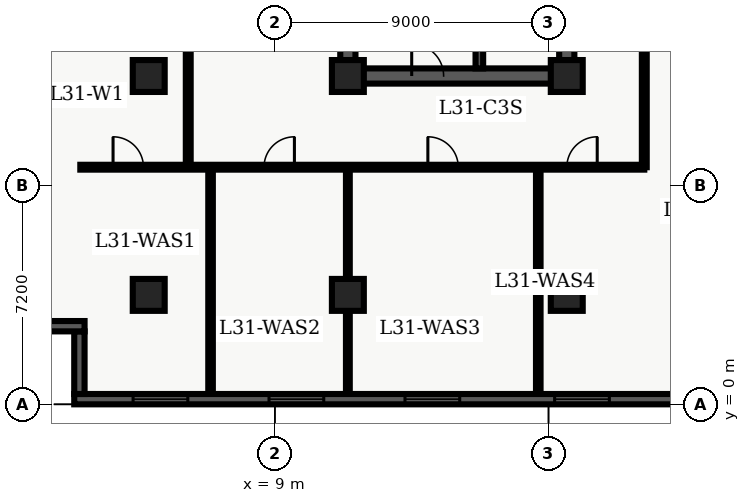
"""IFC4 building model, lengths in metres.
Left out: names, types, materials, properties, quantities, classifications, styles, units other than length and angle.
Written with IfcOpenShell. Run it as: python <this file> out.ifc"""

import sys

from ifc_helpers import new_model, entity, si_unit, converted_unit, direction, frame, origin_with_axes, origin_2d_with_axis, place, context, subcontext, project, spatial, polyline, rectangle, outline, extrude, element, fill, save


model = new_model("IFC4")
c1 = context("Model", 3, precision=1e-05, world=origin_with_axes(), true_north=direction((0.0, 1.0)))
c2 = subcontext(c1, "Body", "Model", "MODEL_VIEW")
j1 = project(units=[si_unit("LENGTHUNIT", "METRE"), converted_unit("PLANEANGLEUNIT", "DEGREE", entity("IfcPlaneAngleMeasure", 0.017), si_unit("PLANEANGLEUNIT", "RADIAN"), dimensions=[0, 0, 0, 0, 0, 0, 0])], contexts=[c1])
p1 = place(None, origin_with_axes())
s1 = spatial("IfcSite", under=j1, at=p1, CompositionType="ELEMENT")
p2 = place(p1, origin_with_axes())
s2 = spatial("IfcBuilding", under=s1, at=p2, CompositionType="ELEMENT")
p3 = place(p2, frame((0.0, 0.0, 129.0), z_axis=(0.0, 0.0, 1.0), x_axis=(1.0, 0.0, 0.0)))
s3 = spatial("IfcBuildingStorey", under=s2, at=p3, CompositionType="ELEMENT", Elevation=129.0)
p4 = place(p3, frame((11.4, 10.8, 0.0), z_axis=(0.0, 0.0, 1.0), x_axis=(0.0, 1.0, 0.0)))
e1 = element("IfcWall", 1, at=p4, inside=s3, PredefinedType="SHEAR", context=c2, shape_type="SweptSolid", body=[
    extrude(outline(polyline([(0.0, -0.25), (27.0, -0.25), (27.0, 0.25), (0.0, 0.25), (0.0, -0.25)])), origin_with_axes(), (0.0, 0.0, 1.0), 3.66),
])
p5 = place(p3, frame((11.4, 10.8, 0.0), z_axis=(0.0, 0.0, 1.0), x_axis=(1.0, 0.0, 0.0)))
e2 = element("IfcWall", 2, at=p5, inside=s3, PredefinedType="SHEAR", context=c2, shape_type="SweptSolid", body=[
    extrude(outline(polyline([(0.0, -0.25), (7.2, -0.25), (7.2, 0.25), (0.0, 0.25), (0.0, -0.25)])), origin_with_axes(), (0.0, 0.0, 1.0), 3.66),
])
p6 = place(p5, frame((2.625, 0.0, 0.0), z_axis=(0.0, 0.0, 1.0), x_axis=(1.0, 0.0, 0.0)))
e3 = element("IfcOpeningElement", 3, at=p6, cuts=e2, PredefinedType="OPENING", context=c2, shape_type="SweptSolid", body=[
    extrude(rectangle(XDim=1.05, YDim=0.52, at=origin_2d_with_axis()), origin_with_axes(), (0.0, 0.0, 1.0), 2.15),
])
p7 = place(p3, frame((18.6, 10.8, 0.0), z_axis=(0.0, 0.0, 1.0), x_axis=(0.0, 1.0, 0.0)))
e4 = element("IfcWall", 4, at=p7, inside=s3, PredefinedType="SHEAR", context=c2, shape_type="SweptSolid", body=[
    extrude(outline(polyline([(0.0, -0.25), (13.5, -0.25), (13.5, 0.25), (0.0, 0.25), (0.0, -0.25)])), origin_with_axes(), (0.0, 0.0, 1.0), 3.66),
])
p8 = place(p7, frame((11.125, 0.0, 0.0), z_axis=(0.0, 0.0, 1.0), x_axis=(1.0, 0.0, 0.0)))
e5 = element("IfcOpeningElement", 5, at=p8, cuts=e4, PredefinedType="OPENING", context=c2, shape_type="SweptSolid", body=[
    extrude(rectangle(XDim=1.05, YDim=0.52, at=origin_2d_with_axis()), origin_with_axes(), (0.0, 0.0, 1.0), 2.15),
])
p9 = place(p7, frame((2.425, 0.0, 0.0), z_axis=(0.0, 0.0, 1.0), x_axis=(1.0, 0.0, 0.0)))
e6 = element("IfcOpeningElement", 6, at=p9, cuts=e4, PredefinedType="OPENING", context=c2, shape_type="SweptSolid", body=[
    extrude(rectangle(XDim=1.05, YDim=0.52, at=origin_2d_with_axis()), origin_with_axes(), (0.0, 0.0, 1.0), 2.15),
])
p10 = place(p7, frame((6.625, 0.0, 0.0), z_axis=(0.0, 0.0, 1.0), x_axis=(1.0, 0.0, 0.0)))
e7 = element("IfcOpeningElement", 7, at=p10, cuts=e4, PredefinedType="OPENING", context=c2, shape_type="SweptSolid", body=[
    extrude(rectangle(XDim=1.05, YDim=0.52, at=origin_2d_with_axis()), origin_with_axes(), (0.0, 0.0, 1.0), 2.15),
])
p11 = place(p3, frame((15.725, 11.05, 0.0), z_axis=(0.0, 0.0, 1.0), x_axis=(0.0, 1.0, 0.0)))
e8 = element("IfcWall", 8, at=p11, inside=s3, PredefinedType="SHEAR", context=c2, shape_type="SweptSolid", body=[
    extrude(outline(polyline([(0.0, -0.125), (8.65, -0.125), (8.65, 0.125), (0.0, 0.125), (0.0, -0.125)])), origin_with_axes(), (0.0, 0.0, 1.0), 3.66),
])
for number, where, z_axis, x_axis in (
    (9, (11.4, 3.6, 0.0), (0.0, 0.0, 1.0), (1.0, 0.0, 0.0)),
    (10, (11.4, 10.8, 0.0), (0.0, 0.0, 1.0), (1.0, 0.0, 0.0)),
    (11, (18.6, 3.6, 0.0), (0.0, 0.0, 1.0), (1.0, 0.0, 0.0)),
    (12, (18.6, 10.8, 0.0), (0.0, 0.0, 1.0), (1.0, 0.0, 0.0)),
    (13, (4.85, 3.6, 0.0), (0.0, 0.0, 1.0), (1.0, 0.0, 0.0)),
    (14, (4.85, 10.8, 0.0), (0.0, 0.0, 1.0), (1.0, 0.0, 0.0)),
):
    element("IfcColumn", number, at=place(p3, frame(where, z_axis=z_axis, x_axis=x_axis)), inside=s3, PredefinedType="COLUMN", context=c2, shape_type="SweptSolid", body=[
        extrude(rectangle(XDim=1.05, YDim=1.05, at=origin_2d_with_axis()), origin_with_axes(), (0.0, 0.0, 1.0), 3.9),
    ])
p12 = place(p3, frame((2.6, 7.8, 0.0), z_axis=(0.0, 0.0, 1.0), x_axis=(1.0, 0.0, 0.0)))
e15 = element("IfcWall", 15, at=p12, inside=s3, PredefinedType="PARTITIONING", context=c2, shape_type="SweptSolid", body=[
    extrude(outline(polyline([(0.0, -0.08), (18.55, -0.08), (18.55, 0.08), (0.0, 0.08), (0.0, -0.08)])), origin_with_axes(), (0.0, 0.0, 1.0), 2.7),
])
p13 = place(p12, frame((1.577, 0.0, 0.0), z_axis=(0.0, 0.0, 1.0), x_axis=(1.0, 0.0, 0.0)))
e16 = element("IfcOpeningElement", 16, at=p13, cuts=e15, PredefinedType="OPENING", context=c2, shape_type="SweptSolid", body=[
    extrude(rectangle(XDim=1.0, YDim=0.18, at=origin_2d_with_axis()), origin_with_axes(), (0.0, 0.0, 1.0), 2.15),
])
p14 = place(p12, frame((6.542, 0.0, 0.0), z_axis=(0.0, 0.0, 1.0), x_axis=(1.0, 0.0, 0.0)))
e17 = element("IfcOpeningElement", 17, at=p14, cuts=e15, PredefinedType="OPENING", context=c2, shape_type="SweptSolid", body=[
    extrude(rectangle(XDim=1.0, YDim=0.18, at=origin_2d_with_axis()), origin_with_axes(), (0.0, 0.0, 1.0), 2.15),
])
p15 = place(p12, frame((11.931, 0.0, 0.0), z_axis=(0.0, 0.0, 1.0), x_axis=(1.0, 0.0, 0.0)))
e18 = element("IfcOpeningElement", 18, at=p15, cuts=e15, PredefinedType="OPENING", context=c2, shape_type="SweptSolid", body=[
    extrude(rectangle(XDim=1.0, YDim=0.18, at=origin_2d_with_axis()), origin_with_axes(), (0.0, 0.0, 1.0), 2.15),
])
p16 = place(p12, frame((16.502, 0.0, 0.0), z_axis=(0.0, 0.0, 1.0), x_axis=(1.0, 0.0, 0.0)))
e19 = element("IfcOpeningElement", 19, at=p16, cuts=e15, PredefinedType="OPENING", context=c2, shape_type="SweptSolid", body=[
    extrude(rectangle(XDim=1.0, YDim=0.18, at=origin_2d_with_axis()), origin_with_axes(), (0.0, 0.0, 1.0), 2.15),
])
p17 = place(p3, frame((21.15, 7.8, 0.0), z_axis=(0.0, 0.0, 1.0), x_axis=(0.0, 1.0, 0.0)))
e20 = element("IfcWall", 20, at=p17, inside=s3, PredefinedType="PARTITIONING", context=c2, shape_type="SweptSolid", body=[
    extrude(outline(polyline([(0.0, -0.08), (32.7, -0.08), (32.7, 0.08), (0.0, 0.08), (0.0, -0.08)])), origin_with_axes(), (0.0, 0.0, 1.0), 2.7),
])
p18 = place(p17, frame((5.775, 0.0, 0.0), z_axis=(0.0, 0.0, 1.0), x_axis=(1.0, 0.0, 0.0)))
e21 = element("IfcOpeningElement", 21, at=p18, cuts=e20, PredefinedType="OPENING", context=c2, shape_type="SweptSolid", body=[
    extrude(rectangle(XDim=1.05, YDim=0.18, at=origin_2d_with_axis()), origin_with_axes(), (0.0, 0.0, 1.0), 2.15),
])
p19 = place(p3, frame((6.15, 7.8, 0.0), z_axis=(0.0, 0.0, 1.0), x_axis=(0.0, 1.0, 0.0)))
e22 = element("IfcWall", 22, at=p19, inside=s3, PredefinedType="PARTITIONING", context=c2, shape_type="SweptSolid", body=[
    extrude(outline(polyline([(0.0, -0.08), (32.7, -0.08), (32.7, 0.08), (0.0, 0.08), (0.0, -0.08)])), origin_with_axes(), (0.0, 0.0, 1.0), 2.7),
])
p20 = place(p19, frame((4.368, 0.0, 0.0), z_axis=(0.0, 0.0, 1.0), x_axis=(1.0, 0.0, 0.0)))
e23 = element("IfcOpeningElement", 23, at=p20, cuts=e22, PredefinedType="OPENING", context=c2, shape_type="SweptSolid", body=[
    extrude(rectangle(XDim=1.0, YDim=0.18, at=origin_2d_with_axis()), origin_with_axes(), (0.0, 0.0, 1.0), 2.15),
])
p21 = place(p19, frame((8.425, 0.0, 0.0), z_axis=(0.0, 0.0, 1.0), x_axis=(1.0, 0.0, 0.0)))
e24 = element("IfcOpeningElement", 24, at=p21, cuts=e22, PredefinedType="OPENING", context=c2, shape_type="SweptSolid", body=[
    extrude(rectangle(XDim=1.0, YDim=0.18, at=origin_2d_with_axis()), origin_with_axes(), (0.0, 0.0, 1.0), 2.15),
])
p22 = place(p19, frame((13.968, 0.0, 0.0), z_axis=(0.0, 0.0, 1.0), x_axis=(1.0, 0.0, 0.0)))
e25 = element("IfcOpeningElement", 25, at=p22, cuts=e22, PredefinedType="OPENING", context=c2, shape_type="SweptSolid", body=[
    extrude(rectangle(XDim=1.0, YDim=0.18, at=origin_2d_with_axis()), origin_with_axes(), (0.0, 0.0, 1.0), 2.15),
])
p23 = place(p19, frame((20.824, 0.0, 0.0), z_axis=(0.0, 0.0, 1.0), x_axis=(1.0, 0.0, 0.0)))
e26 = element("IfcOpeningElement", 26, at=p23, cuts=e22, PredefinedType="OPENING", context=c2, shape_type="SweptSolid", body=[
    extrude(rectangle(XDim=1.0, YDim=0.18, at=origin_2d_with_axis()), origin_with_axes(), (0.0, 0.0, 1.0), 2.15),
])
p24 = place(p19, frame((24.995, 0.0, 0.0), z_axis=(0.0, 0.0, 1.0), x_axis=(1.0, 0.0, 0.0)))
e27 = element("IfcOpeningElement", 27, at=p24, cuts=e22, PredefinedType="OPENING", context=c2, shape_type="SweptSolid", body=[
    extrude(rectangle(XDim=1.0, YDim=0.18, at=origin_2d_with_axis()), origin_with_axes(), (0.0, 0.0, 1.0), 2.15),
])
p25 = place(p19, frame((31.551, 0.0, 0.0), z_axis=(0.0, 0.0, 1.0), x_axis=(1.0, 0.0, 0.0)))
e28 = element("IfcOpeningElement", 28, at=p25, cuts=e22, PredefinedType="OPENING", context=c2, shape_type="SweptSolid", body=[
    extrude(rectangle(XDim=1.0, YDim=0.18, at=origin_2d_with_axis()), origin_with_axes(), (0.0, 0.0, 1.0), 2.15),
])
p26 = place(p3, frame((6.884, 0.335, 0.0), z_axis=(0.0, 0.0, 1.0), x_axis=(0.0, 1.0, 0.0)))
e29 = element("IfcWall", 29, at=p26, inside=s3, PredefinedType="PARTITIONING", context=c2, shape_type="SweptSolid", body=[
    extrude(outline(polyline([(0.0, -0.075), (7.365, -0.075), (7.365, 0.075), (0.0, 0.075), (0.0, -0.075)])), origin_with_axes(), (0.0, 0.0, 1.0), 2.7),
])
p27 = place(p3, frame((11.4, 0.335, 0.0), z_axis=(0.0, 0.0, 1.0), x_axis=(0.0, 1.0, 0.0)))
e30 = element("IfcWall", 30, at=p27, inside=s3, PredefinedType="PARTITIONING", context=c2, shape_type="SweptSolid", body=[
    extrude(outline(polyline([(0.0, -0.062), (7.365, -0.062), (7.365, 0.062), (0.0, 0.062), (0.0, -0.062)])), origin_with_axes(), (0.0, 0.0, 1.0), 2.7),
])
p28 = place(p3, frame((17.663, 0.335, 0.0), z_axis=(0.0, 0.0, 1.0), x_axis=(0.0, 1.0, 0.0)))
e31 = element("IfcWall", 31, at=p28, inside=s3, PredefinedType="PARTITIONING", context=c2, shape_type="SweptSolid", body=[
    extrude(outline(polyline([(0.0, -0.075), (7.365, -0.075), (7.365, 0.075), (0.0, 0.075), (0.0, -0.075)])), origin_with_axes(), (0.0, 0.0, 1.0), 2.7),
])
p29 = place(p3, frame((57.26, 0.17, 0.0), z_axis=(0.0, 0.0, 1.0), x_axis=(-1.0, 0.0, 0.0)))
e32 = element("IfcWall", 32, at=p29, inside=s3, PredefinedType="SOLIDWALL", context=c2, shape_type="SweptSolid", body=[
    extrude(outline(polyline([(0.0, -0.17), (54.86, -0.17), (54.86, 0.17), (0.0, 0.17), (0.0, -0.17)])), origin_with_axes(), (0.0, 0.0, 1.0), 3.66),
])
p30 = place(p29, frame((2.836, 0.0, 0.45), z_axis=(0.0, 0.0, 1.0), x_axis=(1.0, 0.0, 0.0)))
e33 = element("IfcOpeningElement", 33, at=p30, cuts=e32, PredefinedType="OPENING", context=c2, shape_type="SweptSolid", body=[
    extrude(rectangle(XDim=1.8, YDim=0.36, at=origin_2d_with_axis()), origin_with_axes(), (0.0, 0.0, 1.0), 2.1),
])
p31 = place(p29, frame((7.307, 0.0, 0.45), z_axis=(0.0, 0.0, 1.0), x_axis=(1.0, 0.0, 0.0)))
e34 = element("IfcOpeningElement", 34, at=p31, cuts=e32, PredefinedType="OPENING", context=c2, shape_type="SweptSolid", body=[
    extrude(rectangle(XDim=1.8, YDim=0.36, at=origin_2d_with_axis()), origin_with_axes(), (0.0, 0.0, 1.0), 2.1),
])
p32 = place(p29, frame((11.779, 0.0, 0.45), z_axis=(0.0, 0.0, 1.0), x_axis=(1.0, 0.0, 0.0)))
e35 = element("IfcOpeningElement", 35, at=p32, cuts=e32, PredefinedType="OPENING", context=c2, shape_type="SweptSolid", body=[
    extrude(rectangle(XDim=1.8, YDim=0.36, at=origin_2d_with_axis()), origin_with_axes(), (0.0, 0.0, 1.0), 2.1),
])
p33 = place(p29, frame((16.251, 0.0, 0.45), z_axis=(0.0, 0.0, 1.0), x_axis=(1.0, 0.0, 0.0)))
e36 = element("IfcOpeningElement", 36, at=p33, cuts=e32, PredefinedType="OPENING", context=c2, shape_type="SweptSolid", body=[
    extrude(rectangle(XDim=1.8, YDim=0.36, at=origin_2d_with_axis()), origin_with_axes(), (0.0, 0.0, 1.0), 2.1),
])
p34 = place(p29, frame((20.723, 0.0, 0.45), z_axis=(0.0, 0.0, 1.0), x_axis=(1.0, 0.0, 0.0)))
e37 = element("IfcOpeningElement", 37, at=p34, cuts=e32, PredefinedType="OPENING", context=c2, shape_type="SweptSolid", body=[
    extrude(rectangle(XDim=1.8, YDim=0.36, at=origin_2d_with_axis()), origin_with_axes(), (0.0, 0.0, 1.0), 2.1),
])
p35 = place(p29, frame((25.194, 0.0, 0.45), z_axis=(0.0, 0.0, 1.0), x_axis=(1.0, 0.0, 0.0)))
e38 = element("IfcOpeningElement", 38, at=p35, cuts=e32, PredefinedType="OPENING", context=c2, shape_type="SweptSolid", body=[
    extrude(rectangle(XDim=1.8, YDim=0.36, at=origin_2d_with_axis()), origin_with_axes(), (0.0, 0.0, 1.0), 2.1),
])
p36 = place(p29, frame((29.666, 0.0, 0.45), z_axis=(0.0, 0.0, 1.0), x_axis=(1.0, 0.0, 0.0)))
e39 = element("IfcOpeningElement", 39, at=p36, cuts=e32, PredefinedType="OPENING", context=c2, shape_type="SweptSolid", body=[
    extrude(rectangle(XDim=1.8, YDim=0.36, at=origin_2d_with_axis()), origin_with_axes(), (0.0, 0.0, 1.0), 2.1),
])
p37 = place(p29, frame((34.138, 0.0, 0.45), z_axis=(0.0, 0.0, 1.0), x_axis=(1.0, 0.0, 0.0)))
e40 = element("IfcOpeningElement", 40, at=p37, cuts=e32, PredefinedType="OPENING", context=c2, shape_type="SweptSolid", body=[
    extrude(rectangle(XDim=1.8, YDim=0.36, at=origin_2d_with_axis()), origin_with_axes(), (0.0, 0.0, 1.0), 2.1),
])
p38 = place(p29, frame((38.159, 0.0, 0.45), z_axis=(0.0, 0.0, 1.0), x_axis=(1.0, 0.0, 0.0)))
e41 = element("IfcOpeningElement", 41, at=p38, cuts=e32, PredefinedType="OPENING", context=c2, shape_type="SweptSolid", body=[
    extrude(rectangle(XDim=1.8, YDim=0.36, at=origin_2d_with_axis()), origin_with_axes(), (0.0, 0.0, 1.0), 2.1),
])
p39 = place(p29, frame((43.081, 0.0, 0.45), z_axis=(0.0, 0.0, 1.0), x_axis=(1.0, 0.0, 0.0)))
e42 = element("IfcOpeningElement", 42, at=p39, cuts=e32, PredefinedType="OPENING", context=c2, shape_type="SweptSolid", body=[
    extrude(rectangle(XDim=1.8, YDim=0.36, at=origin_2d_with_axis()), origin_with_axes(), (0.0, 0.0, 1.0), 2.1),
])
p40 = place(p29, frame((47.553, 0.0, 0.45), z_axis=(0.0, 0.0, 1.0), x_axis=(1.0, 0.0, 0.0)))
e43 = element("IfcOpeningElement", 43, at=p40, cuts=e32, PredefinedType="OPENING", context=c2, shape_type="SweptSolid", body=[
    extrude(rectangle(XDim=1.8, YDim=0.36, at=origin_2d_with_axis()), origin_with_axes(), (0.0, 0.0, 1.0), 2.1),
])
p41 = place(p29, frame((52.024, 0.0, 0.45), z_axis=(0.0, 0.0, 1.0), x_axis=(1.0, 0.0, 0.0)))
e44 = element("IfcOpeningElement", 44, at=p41, cuts=e32, PredefinedType="OPENING", context=c2, shape_type="SweptSolid", body=[
    extrude(rectangle(XDim=1.8, YDim=0.36, at=origin_2d_with_axis()), origin_with_axes(), (0.0, 0.0, 1.0), 2.1),
])
p42 = place(p3, frame((2.57, 0.34, 0.0), z_axis=(0.0, 0.0, 1.0), x_axis=(0.0, 1.0, 0.0)))
e45 = element("IfcWall", 45, at=p42, inside=s3, PredefinedType="SOLIDWALL", context=c2, shape_type="SweptSolid", body=[
    extrude(outline(polyline([(0.0, -0.17), (2.06, -0.17), (2.06, 0.17), (0.0, 0.17), (0.0, -0.17)])), origin_with_axes(), (0.0, 0.0, 1.0), 3.66),
])
p43 = place(p3, frame((2.74, 2.57, 0.0), z_axis=(0.0, 0.0, 1.0), x_axis=(-1.0, 0.0, 0.0)))
e46 = element("IfcWall", 46, at=p43, inside=s3, PredefinedType="SOLIDWALL", context=c2, shape_type="SweptSolid", body=[
    extrude(outline(polyline([(0.0, -0.17), (2.74, -0.17), (2.74, 0.17), (0.0, 0.17), (0.0, -0.17)])), origin_with_axes(), (0.0, 0.0, 1.0), 3.66),
])
p44 = place(p5, frame((2.625, 0.0, 0.0), z_axis=(0.0, 0.0, 1.0), x_axis=(1.0, 0.0, 0.0)))
e47 = element("IfcDoor", 47, at=p44, inside=s3, OperationType="SINGLE_SWING_LEFT", PredefinedType="DOOR", context=c2, shape_type="SweptSolid", body=[
    extrude(rectangle(XDim=1.05, YDim=0.09, at=origin_2d_with_axis()), origin_with_axes(), (0.0, 0.0, 1.0), 2.15),
])
fill(e3, e47)
p45 = place(p12, frame((1.577, 0.0, 0.0), z_axis=(0.0, 0.0, 1.0), x_axis=(1.0, 0.0, 0.0)))
e48 = element("IfcDoor", 48, at=p45, inside=s3, OperationType="SINGLE_SWING_LEFT", PredefinedType="DOOR", context=c2, shape_type="SweptSolid", body=[
    extrude(rectangle(XDim=1.0, YDim=0.09, at=origin_2d_with_axis()), origin_with_axes(), (0.0, 0.0, 1.0), 2.15),
])
fill(e16, e48)
p46 = place(p12, frame((6.542, 0.0, 0.0), z_axis=(0.0, 0.0, 1.0), x_axis=(1.0, 0.0, 0.0)))
e49 = element("IfcDoor", 49, at=p46, inside=s3, OperationType="SINGLE_SWING_RIGHT", PredefinedType="DOOR", context=c2, shape_type="SweptSolid", body=[
    extrude(rectangle(XDim=1.0, YDim=0.09, at=origin_2d_with_axis()), origin_with_axes(), (0.0, 0.0, 1.0), 2.15),
])
fill(e17, e49)
p47 = place(p12, frame((11.931, 0.0, 0.0), z_axis=(0.0, 0.0, 1.0), x_axis=(1.0, 0.0, 0.0)))
e50 = element("IfcDoor", 50, at=p47, inside=s3, OperationType="SINGLE_SWING_LEFT", PredefinedType="DOOR", context=c2, shape_type="SweptSolid", body=[
    extrude(rectangle(XDim=1.0, YDim=0.09, at=origin_2d_with_axis()), origin_with_axes(), (0.0, 0.0, 1.0), 2.15),
])
fill(e18, e50)
p48 = place(p12, frame((16.502, 0.0, 0.0), z_axis=(0.0, 0.0, 1.0), x_axis=(1.0, 0.0, 0.0)))
e51 = element("IfcDoor", 51, at=p48, inside=s3, OperationType="SINGLE_SWING_RIGHT", PredefinedType="DOOR", context=c2, shape_type="SweptSolid", body=[
    extrude(rectangle(XDim=1.0, YDim=0.09, at=origin_2d_with_axis()), origin_with_axes(), (0.0, 0.0, 1.0), 2.15),
])
fill(e19, e51)
p49 = place(p29, frame((38.159, 0.0, 0.45), z_axis=(0.0, 0.0, 1.0), x_axis=(1.0, 0.0, 0.0)))
e52 = element("IfcWindow", 52, at=p49, inside=s3, PredefinedType="WINDOW", context=c2, shape_type="SweptSolid", body=[
    extrude(rectangle(XDim=1.8, YDim=0.09, at=origin_2d_with_axis()), origin_with_axes(), (0.0, 0.0, 1.0), 2.1),
])
fill(e41, e52)
p50 = place(p29, frame((43.081, 0.0, 0.45), z_axis=(0.0, 0.0, 1.0), x_axis=(1.0, 0.0, 0.0)))
e53 = element("IfcWindow", 53, at=p50, inside=s3, PredefinedType="WINDOW", context=c2, shape_type="SweptSolid", body=[
    extrude(rectangle(XDim=1.8, YDim=0.09, at=origin_2d_with_axis()), origin_with_axes(), (0.0, 0.0, 1.0), 2.1),
])
fill(e42, e53)
p51 = place(p29, frame((47.553, 0.0, 0.45), z_axis=(0.0, 0.0, 1.0), x_axis=(1.0, 0.0, 0.0)))
e54 = element("IfcWindow", 54, at=p51, inside=s3, PredefinedType="WINDOW", context=c2, shape_type="SweptSolid", body=[
    extrude(rectangle(XDim=1.8, YDim=0.09, at=origin_2d_with_axis()), origin_with_axes(), (0.0, 0.0, 1.0), 2.1),
])
fill(e43, e54)
p52 = place(p29, frame((52.024, 0.0, 0.45), z_axis=(0.0, 0.0, 1.0), x_axis=(1.0, 0.0, 0.0)))
e55 = element("IfcWindow", 55, at=p52, inside=s3, PredefinedType="WINDOW", context=c2, shape_type="SweptSolid", body=[
    extrude(rectangle(XDim=1.8, YDim=0.09, at=origin_2d_with_axis()), origin_with_axes(), (0.0, 0.0, 1.0), 2.1),
])
fill(e44, e55)
save(model, sys.argv[1])
